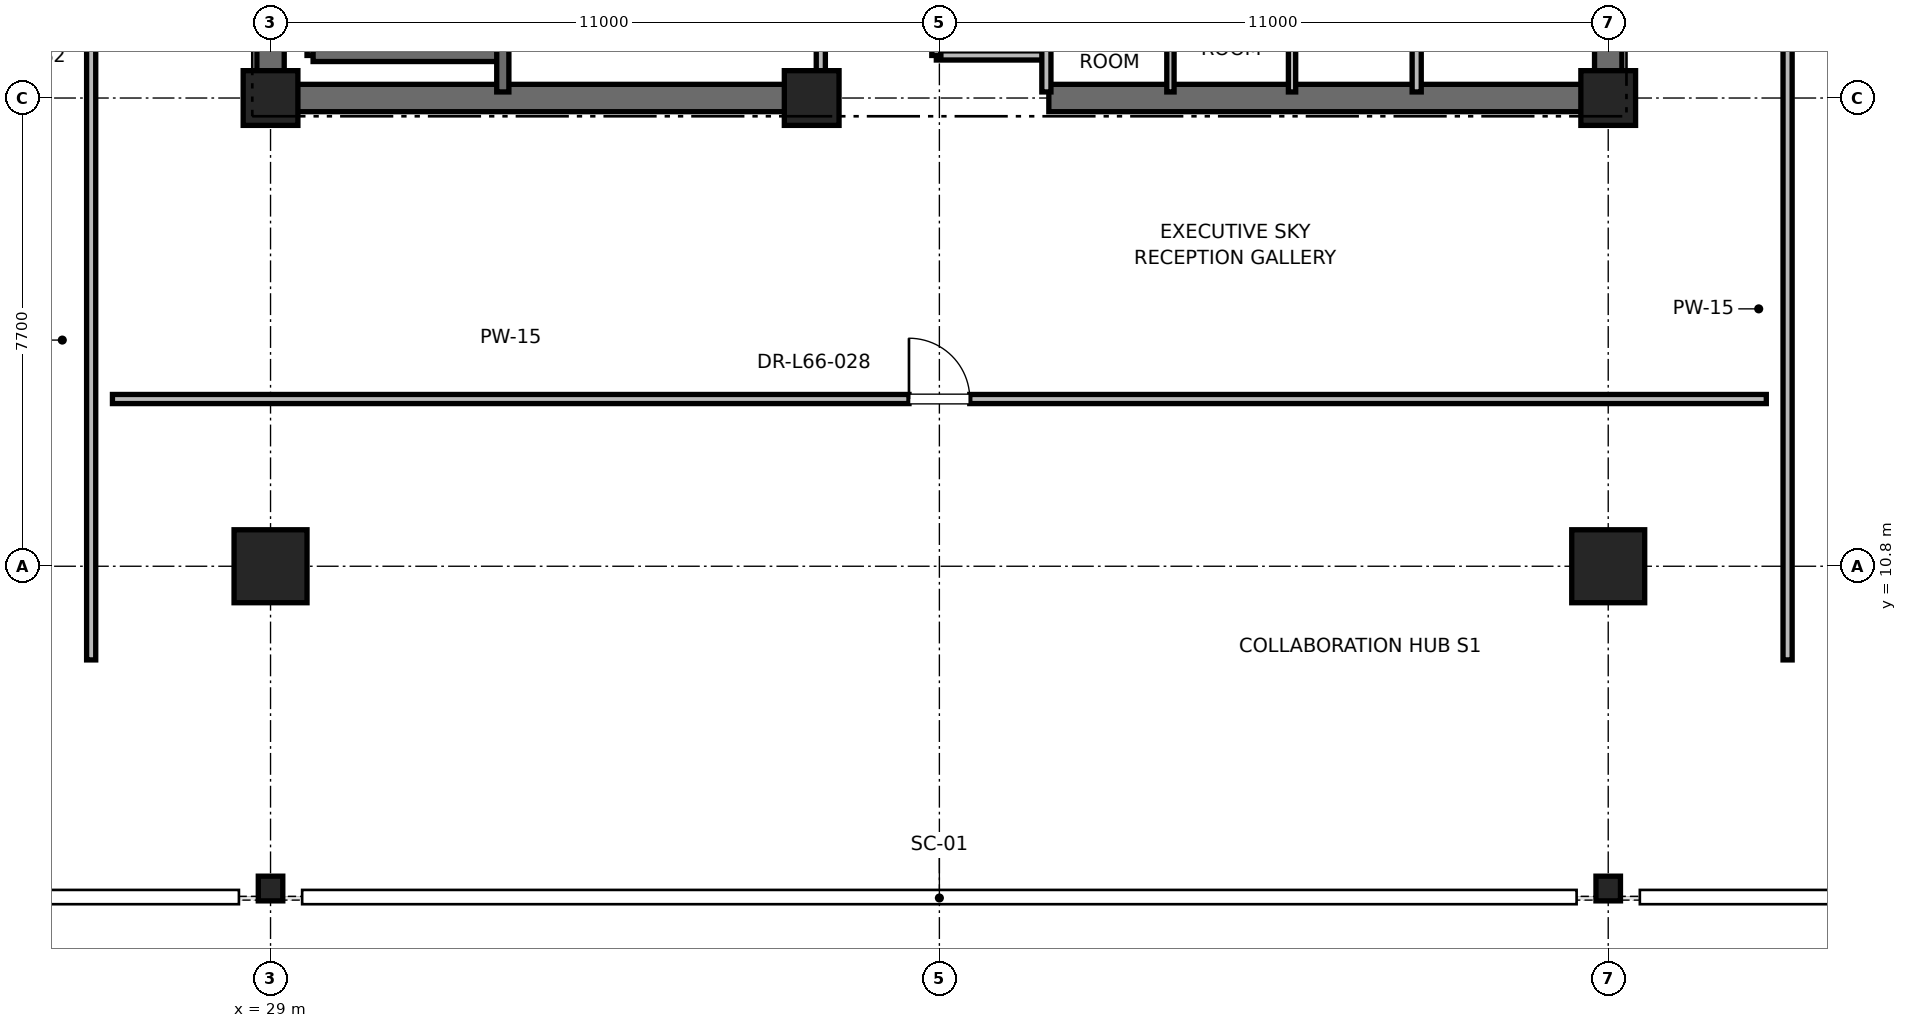
"""IFC4 building model, lengths in metres.
Left out: names, types, materials, properties, quantities, classifications, styles, units other than length and angle.
Written with IfcOpenShell. Run it as: python <this file> out.ifc"""

import sys

from ifc_helpers import new_model, si_unit, direction, frame, frame_2d, origin, origin_2d, place, context, subcontext, project, spatial, rectangle, i_section, extrude, element, fill, save


model = new_model("IFC4")
c1 = context("Model", 3, precision=1e-05, world=origin(), true_north=direction((0.0, 1.0)))
c2 = subcontext(c1, "Body", "Model", "MODEL_VIEW")
j1 = project(units=[si_unit("LENGTHUNIT", "METRE"), si_unit("PLANEANGLEUNIT", "RADIAN")], contexts=[c1])
p1 = place(None, origin())
s1 = spatial("IfcSite", under=j1, at=p1, CompositionType="ELEMENT")
p2 = place(p1, origin())
s2 = spatial("IfcBuilding", under=s1, at=p2, CompositionType="ELEMENT")
p3 = place(p2, frame((0.0, 0.0, 283.2)))
s3 = spatial("IfcBuildingStorey", under=s2, at=p3, CompositionType="ELEMENT", Elevation=283.2)
for number, where, z_axis, x_axis in (
    (1, (29.0, 10.8, 0.0), (0.0, 0.0, 1.0), (1.0, 0.0, 0.0)),
    (2, (51.0, 10.8, 0.0), (0.0, 0.0, 1.0), (1.0, 0.0, 0.0)),
):
    element("IfcColumn", number, at=place(p3, frame(where, z_axis=z_axis, x_axis=x_axis)), inside=s3, PredefinedType="COLUMN", context=c2, shape_type="SweptSolid", body=[
        extrude(rectangle(XDim=1.2, YDim=1.2, at=origin_2d()), origin(), (0.0, 0.0, 1.0), 4.0),
    ])
for number, where, z_axis, x_axis in (
    (3, (29.0, 5.5, 0.0), (0.0, 0.0, 1.0), (1.0, 0.0, 0.0)),
    (4, (51.0, 5.5, 0.0), (0.0, 0.0, 1.0), (1.0, 0.0, 0.0)),
):
    element("IfcColumn", number, at=place(p3, frame(where, z_axis=z_axis, x_axis=x_axis)), inside=s3, PredefinedType="COLUMN", context=c2, shape_type="SweptSolid", body=[
        extrude(i_section(OverallWidth=0.403, OverallDepth=0.406, WebThickness=0.027, FlangeThickness=0.043, FilletRadius=0.015, at=origin_2d()), origin(), (0.0, 0.0, 1.0), 4.0),
    ])
for number, where, z_axis, x_axis in (
    (5, (29.0, 18.5, 0.0), (0.0, 0.0, 1.0), (1.0, 0.0, 0.0)),
    (6, (51.0, 18.5, 0.0), (0.0, 0.0, 1.0), (1.0, 0.0, 0.0)),
    (7, (37.9, 18.5, 0.0), (0.0, 0.0, 1.0), (1.0, 0.0, 0.0)),
):
    element("IfcColumn", number, at=place(p3, frame(where, z_axis=z_axis, x_axis=x_axis)), inside=s3, PredefinedType="PILASTER", context=c2, shape_type="SweptSolid", body=[
        extrude(rectangle(XDim=0.9, YDim=0.9, at=origin_2d()), origin(), (0.0, 0.0, 1.0), 4.0),
    ])
for number, where, z_axis, x_axis in (
    (8, (29.0, 18.5, 0.0), (0.0, 0.0, 1.0), (1.0, 0.0, 0.0)),
    (9, (41.8, 18.5, 0.0), (0.0, 0.0, 1.0), (1.0, 0.0, 0.0)),
):
    element("IfcWall", number, at=place(p3, frame(where, z_axis=z_axis, x_axis=x_axis)), inside=s3, PredefinedType="SHEAR", context=c2, shape_type="SweptSolid", body=[
        extrude(rectangle(XDim=9.2, YDim=0.45, at=frame_2d((4.6, 0.0))), origin(), (0.0, 0.0, 1.0), 3.785),
    ])
p4 = place(p3, frame((29.0, 18.5, 0.0), z_axis=(0.0, 0.0, 1.0), x_axis=(0.0, 1.0, 0.0)))
e10 = element("IfcWall", 10, at=p4, inside=s3, PredefinedType="SHEAR", context=c2, shape_type="SweptSolid", body=[
    extrude(rectangle(XDim=8.8, YDim=0.45, at=frame_2d((4.4, 0.0))), origin(), (0.0, 0.0, 1.0), 3.785),
])
p5 = place(p3, frame((51.0, 18.5, 0.0), z_axis=(0.0, 0.0, 1.0), x_axis=(0.0, 1.0, 0.0)))
e11 = element("IfcWall", 11, at=p5, inside=s3, PredefinedType="SHEAR", context=c2, shape_type="SweptSolid", body=[
    extrude(rectangle(XDim=5.8, YDim=0.45, at=frame_2d((2.9, 0.0))), origin(), (0.0, 0.0, 1.0), 3.785),
])
p6 = place(p3, frame((29.7, 19.2, 0.0), z_axis=(0.0, 0.0, 1.0), x_axis=(0.0, 1.0, 0.0)))
e12 = element("IfcWall", 12, at=p6, inside=s3, PredefinedType="SOLIDWALL", context=c2, shape_type="SweptSolid", body=[
    extrude(rectangle(XDim=8.15, YDim=0.2, at=frame_2d((4.075, 0.0))), origin(), (0.0, 0.0, 1.0), 3.785),
])
p7 = place(p3, frame((29.7, 19.2, 0.0), z_axis=(0.0, 0.0, 1.0), x_axis=(1.0, 0.0, 0.0)))
e13 = element("IfcWall", 13, at=p7, inside=s3, PredefinedType="SOLIDWALL", context=c2, shape_type="SweptSolid", body=[
    extrude(rectangle(XDim=3.12, YDim=0.2, at=frame_2d((1.56, 0.0))), origin(), (0.0, 0.0, 1.0), 3.785),
])
p8 = place(p3, frame((32.82, 18.6, 0.0), z_axis=(0.0, 0.0, 1.0), x_axis=(0.0, 1.0, 0.0)))
e14 = element("IfcWall", 14, at=p8, inside=s3, PredefinedType="SOLIDWALL", context=c2, shape_type="SweptSolid", body=[
    extrude(rectangle(XDim=8.78, YDim=0.2, at=frame_2d((4.39, 0.0))), origin(), (0.0, 0.0, 1.0), 3.785),
])
p9 = place(p3, frame((39.95, 19.2, 0.0), z_axis=(0.0, 0.0, 1.0), x_axis=(1.0, 0.0, 0.0)))
e15 = element("IfcWall", 15, at=p9, inside=s3, PredefinedType="PARTITIONING", context=c2, shape_type="SweptSolid", body=[
    extrude(rectangle(XDim=1.81, YDim=0.15, at=frame_2d((0.905, 0.0))), origin(), (0.0, 0.0, 1.0), 2.85),
])
p10 = place(p3, frame((41.76, 18.6, 0.0), z_axis=(0.0, 0.0, 1.0), x_axis=(0.0, 1.0, 0.0)))
e16 = element("IfcWall", 16, at=p10, inside=s3, PredefinedType="PARTITIONING", context=c2, shape_type="SweptSolid", body=[
    extrude(rectangle(XDim=3.6, YDim=0.15, at=frame_2d((1.8, 0.0))), origin(), (0.0, 0.0, 1.0), 2.85),
])
p11 = place(p3, frame((39.95, 19.2, 0.0), z_axis=(0.0, 0.0, 1.0), x_axis=(0.0, 1.0, 0.0)))
e17 = element("IfcWall", 17, at=p11, inside=s3, PredefinedType="PARTITIONING", context=c2, shape_type="SweptSolid", body=[
    extrude(rectangle(XDim=3.0, YDim=0.15, at=frame_2d((1.5, 0.0))), origin(), (0.0, 0.0, 1.0), 2.85),
])
p12 = place(p11, frame((1.05, 0.0, 0.0)))
e18 = element("IfcOpeningElement", 18, at=p12, cuts=e17, PredefinedType="OPENING", context=c2, shape_type="SweptSolid", body=[
    extrude(rectangle(XDim=0.9, YDim=2.1, at=frame_2d((0.45, 1.05))), frame((0.0, 0.075, 0.0), z_axis=(0.0, -1.0, 0.0), x_axis=(1.0, 0.0, 0.0)), (0.0, 0.0, 1.0), 0.15),
])
p13 = place(p3, frame((38.05, 18.6, 0.0), z_axis=(0.0, 0.0, 1.0), x_axis=(0.0, 1.0, 0.0)))
e19 = element("IfcWall", 19, at=p13, inside=s3, PredefinedType="PARTITIONING", context=c2, shape_type="SweptSolid", body=[
    extrude(rectangle(XDim=3.06, YDim=0.15, at=frame_2d((1.53, 0.0))), origin(), (0.0, 0.0, 1.0), 2.85),
])
p14 = place(p13, frame((1.03, 0.0, 0.0)))
e20 = element("IfcOpeningElement", 20, at=p14, cuts=e19, PredefinedType="OPENING", context=c2, shape_type="SweptSolid", body=[
    extrude(rectangle(XDim=1.0, YDim=2.15, at=frame_2d((0.5, 1.075))), frame((0.0, 0.075, 0.0), z_axis=(0.0, -1.0, 0.0), x_axis=(1.0, 0.0, 0.0)), (0.0, 0.0, 1.0), 0.15),
])
p15 = place(p3, frame((47.85, 18.6, 0.0), z_axis=(0.0, 0.0, 1.0), x_axis=(0.0, 1.0, 0.0)))
e21 = element("IfcWall", 21, at=p15, inside=s3, PredefinedType="PARTITIONING", context=c2, shape_type="SweptSolid", body=[
    extrude(rectangle(XDim=2.54, YDim=0.15, at=frame_2d((1.27, 0.0))), origin(), (0.0, 0.0, 1.0), 2.85),
])
for number, where, z_axis, x_axis in (
    (22, (43.8, 18.6, 0.0), (0.0, 0.0, 1.0), (0.0, 1.0, 0.0)),
    (23, (45.8, 18.6, 0.0), (0.0, 0.0, 1.0), (0.0, 1.0, 0.0)),
):
    element("IfcWall", number, at=place(p3, frame(where, z_axis=z_axis, x_axis=x_axis)), inside=s3, PredefinedType="PARTITIONING", context=c2, shape_type="SweptSolid", body=[
        extrude(rectangle(XDim=3.02, YDim=0.12, at=frame_2d((1.51, 0.0))), origin(), (0.0, 0.0, 1.0), 2.85),
    ])
p16 = place(p3, frame((26.4, 13.55, 0.0), z_axis=(0.0, 0.0, 1.0), x_axis=(1.0, 0.0, 0.0)))
e24 = element("IfcWall", 24, at=p16, inside=s3, PredefinedType="PARTITIONING", context=c2, shape_type="SweptSolid", body=[
    extrude(rectangle(XDim=27.2, YDim=0.15, at=frame_2d((13.6, 0.0))), origin(), (0.0, 0.0, 1.0), 2.85),
])
p17 = place(p16, frame((13.1, 0.0, 0.0)))
e25 = element("IfcOpeningElement", 25, at=p17, cuts=e24, PredefinedType="OPENING", context=c2, shape_type="SweptSolid", body=[
    extrude(rectangle(XDim=1.0, YDim=2.15, at=frame_2d((0.5, 1.075))), frame((0.0, 0.075, 0.0), z_axis=(0.0, -1.0, 0.0), x_axis=(1.0, 0.0, 0.0)), (0.0, 0.0, 1.0), 0.15),
])
p18 = place(p3, frame((26.05, 9.26, 0.0), z_axis=(0.0, 0.0, 1.0), x_axis=(0.0, 1.0, 0.0)))
e26 = element("IfcWall", 26, at=p18, inside=s3, PredefinedType="PARTITIONING", context=c2, shape_type="SweptSolid", body=[
    extrude(rectangle(XDim=12.768, YDim=0.15, at=frame_2d((6.384, 0.0))), origin(), (0.0, 0.0, 1.0), 2.85),
])
p19 = place(p18, frame((10.519, 0.0, 0.0)))
e27 = element("IfcOpeningElement", 27, at=p19, cuts=e26, PredefinedType="OPENING", context=c2, shape_type="SweptSolid", body=[
    extrude(rectangle(XDim=1.0, YDim=2.15, at=frame_2d((0.5, 1.075))), frame((0.0, 0.075, 0.0), z_axis=(0.0, -1.0, 0.0), x_axis=(1.0, 0.0, 0.0)), (0.0, 0.0, 1.0), 0.15),
])
p20 = place(p3, frame((53.95, 9.26, 0.0), z_axis=(0.0, 0.0, 1.0), x_axis=(0.0, 1.0, 0.0)))
e28 = element("IfcWall", 28, at=p20, inside=s3, PredefinedType="PARTITIONING", context=c2, shape_type="SweptSolid", body=[
    extrude(rectangle(XDim=15.322, YDim=0.15, at=frame_2d((7.661, 0.0))), origin(), (0.0, 0.0, 1.0), 2.85),
])
p21 = place(p20, frame((11.546, 0.0, 0.0)))
e29 = element("IfcOpeningElement", 29, at=p21, cuts=e28, PredefinedType="OPENING", context=c2, shape_type="SweptSolid", body=[
    extrude(rectangle(XDim=1.5, YDim=2.25, at=frame_2d((0.75, 1.125))), frame((0.0, 0.075, 0.0), z_axis=(0.0, -1.0, 0.0), x_axis=(1.0, 0.0, 0.0)), (0.0, 0.0, 1.0), 0.15),
])
p22 = place(p17, origin())
e30 = element("IfcDoor", 30, at=p22, inside=s3, OperationType="SINGLE_SWING_LEFT", PredefinedType="DOOR", context=c2, shape_type="SweptSolid", body=[
    extrude(rectangle(XDim=1.0, YDim=2.15, at=frame_2d((0.5, 1.075))), frame((0.0, 0.025, 0.0), z_axis=(0.0, -1.0, 0.0), x_axis=(1.0, 0.0, 0.0)), (0.0, 0.0, 1.0), 0.05),
])
fill(e25, e30)
save(model, sys.argv[1])
